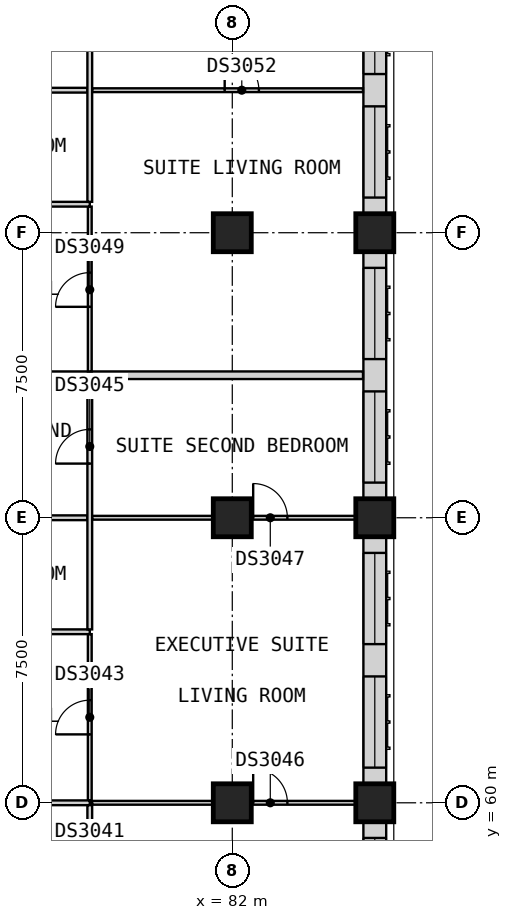
"""IFC4 building model, lengths in metres.
Left out: names, types, materials, properties, quantities, classifications, styles, units other than length and angle.
Written with IfcOpenShell. Run it as: python <this file> out.ifc"""

import sys

from ifc_helpers import new_model, si_unit, direction, frame, frame_2d, origin, origin_2d, place, context, subcontext, project, spatial, rectangle, extrude, element, fill, save


model = new_model("IFC4")
c1 = context("Model", 3, precision=1e-05, world=origin(), true_north=direction((0.0, 1.0)))
c2 = subcontext(c1, "Body", "Model", "MODEL_VIEW")
j1 = project(units=[si_unit("LENGTHUNIT", "METRE"), si_unit("PLANEANGLEUNIT", "RADIAN")], contexts=[c1])
p1 = place(None, origin())
s1 = spatial("IfcSite", under=j1, at=p1, CompositionType="ELEMENT")
p2 = place(p1, origin())
s2 = spatial("IfcBuilding", under=s1, at=p2, CompositionType="ELEMENT")
p3 = place(p2, frame((0.0, 0.0, 137.4)))
s3 = spatial("IfcBuildingStorey", under=s2, at=p3, CompositionType="ELEMENT", Elevation=137.4)
for number, where, z_axis, x_axis in (
    (1, (85.75, 60.0, 0.0), (0.0, 0.0, 1.0), (1.0, 0.0, 0.0)),
    (2, (85.75, 67.5, 0.0), (0.0, 0.0, 1.0), (1.0, 0.0, 0.0)),
    (3, (85.75, 75.0, 0.0), (0.0, 0.0, 1.0), (1.0, 0.0, 0.0)),
    (4, (82.0, 60.0, 0.0), (0.0, 0.0, 1.0), (1.0, 0.0, 0.0)),
    (5, (82.0, 67.5, 0.0), (0.0, 0.0, 1.0), (1.0, 0.0, 0.0)),
    (6, (82.0, 75.0, 0.0), (0.0, 0.0, 1.0), (1.0, 0.0, 0.0)),
):
    element("IfcColumn", number, at=place(p3, frame(where, z_axis=z_axis, x_axis=x_axis)), inside=s3, PredefinedType="COLUMN", context=c2, shape_type="SweptSolid", body=[
        extrude(rectangle(XDim=1.0, YDim=1.0, at=origin_2d()), origin(), (0.0, 0.0, 1.0), 3.6),
    ])
p4 = place(p3, frame((85.75, 53.0, 0.0), z_axis=(0.0, 0.0, 1.0), x_axis=(0.0, 1.0, 0.0)))
e7 = element("IfcWall", 7, at=p4, inside=s3, PredefinedType="SOLIDWALL", context=c2, shape_type="SweptSolid", body=[
    extrude(rectangle(XDim=6.5, YDim=0.6, at=frame_2d((3.25, 0.0))), origin(), (0.0, 0.0, 1.0), 2.85),
])
p5 = place(p4, frame((0.425, 0.0, 0.8)))
e8 = element("IfcOpeningElement", 8, at=p5, cuts=e7, PredefinedType="OPENING", context=c2, shape_type="SweptSolid", body=[
    extrude(rectangle(XDim=2.4, YDim=1.8, at=frame_2d((1.2, 0.9))), frame((0.0, 0.31, 0.0), z_axis=(0.0, -1.0, 0.0), x_axis=(1.0, 0.0, 0.0)), (0.0, 0.0, 1.0), 0.62),
])
p6 = place(p4, frame((3.675, 0.0, 0.8)))
e9 = element("IfcOpeningElement", 9, at=p6, cuts=e7, PredefinedType="OPENING", context=c2, shape_type="SweptSolid", body=[
    extrude(rectangle(XDim=2.4, YDim=1.8, at=frame_2d((1.2, 0.9))), frame((0.0, 0.31, 0.0), z_axis=(0.0, -1.0, 0.0), x_axis=(1.0, 0.0, 0.0)), (0.0, 0.0, 1.0), 0.62),
])
p7 = place(p3, frame((85.75, 60.5, 0.0), z_axis=(0.0, 0.0, 1.0), x_axis=(0.0, 1.0, 0.0)))
e10 = element("IfcWall", 10, at=p7, inside=s3, PredefinedType="SOLIDWALL", context=c2, shape_type="SweptSolid", body=[
    extrude(rectangle(XDim=6.5, YDim=0.6, at=frame_2d((3.25, 0.0))), origin(), (0.0, 0.0, 1.0), 2.85),
])
p8 = place(p7, frame((0.425, 0.0, 0.8)))
e11 = element("IfcOpeningElement", 11, at=p8, cuts=e10, PredefinedType="OPENING", context=c2, shape_type="SweptSolid", body=[
    extrude(rectangle(XDim=2.4, YDim=1.8, at=frame_2d((1.2, 0.9))), frame((0.0, 0.31, 0.0), z_axis=(0.0, -1.0, 0.0), x_axis=(1.0, 0.0, 0.0)), (0.0, 0.0, 1.0), 0.62),
])
p9 = place(p7, frame((3.675, 0.0, 0.8)))
e12 = element("IfcOpeningElement", 12, at=p9, cuts=e10, PredefinedType="OPENING", context=c2, shape_type="SweptSolid", body=[
    extrude(rectangle(XDim=2.4, YDim=1.8, at=frame_2d((1.2, 0.9))), frame((0.0, 0.31, 0.0), z_axis=(0.0, -1.0, 0.0), x_axis=(1.0, 0.0, 0.0)), (0.0, 0.0, 1.0), 0.62),
])
p10 = place(p3, frame((85.75, 68.0, 0.0), z_axis=(0.0, 0.0, 1.0), x_axis=(0.0, 1.0, 0.0)))
e13 = element("IfcWall", 13, at=p10, inside=s3, PredefinedType="SOLIDWALL", context=c2, shape_type="SweptSolid", body=[
    extrude(rectangle(XDim=6.5, YDim=0.6, at=frame_2d((3.25, 0.0))), origin(), (0.0, 0.0, 1.0), 2.85),
])
p11 = place(p10, frame((0.425, 0.0, 0.8)))
e14 = element("IfcOpeningElement", 14, at=p11, cuts=e13, PredefinedType="OPENING", context=c2, shape_type="SweptSolid", body=[
    extrude(rectangle(XDim=2.4, YDim=1.8, at=frame_2d((1.2, 0.9))), frame((0.0, 0.31, 0.0), z_axis=(0.0, -1.0, 0.0), x_axis=(1.0, 0.0, 0.0)), (0.0, 0.0, 1.0), 0.62),
])
p12 = place(p10, frame((3.675, 0.0, 0.8)))
e15 = element("IfcOpeningElement", 15, at=p12, cuts=e13, PredefinedType="OPENING", context=c2, shape_type="SweptSolid", body=[
    extrude(rectangle(XDim=2.4, YDim=1.8, at=frame_2d((1.2, 0.9))), frame((0.0, 0.31, 0.0), z_axis=(0.0, -1.0, 0.0), x_axis=(1.0, 0.0, 0.0)), (0.0, 0.0, 1.0), 0.62),
])
p13 = place(p3, frame((85.75, 75.5, 0.0), z_axis=(0.0, 0.0, 1.0), x_axis=(0.0, 1.0, 0.0)))
e16 = element("IfcWall", 16, at=p13, inside=s3, PredefinedType="SOLIDWALL", context=c2, shape_type="SweptSolid", body=[
    extrude(rectangle(XDim=6.5, YDim=0.6, at=frame_2d((3.25, 0.0))), origin(), (0.0, 0.0, 1.0), 2.85),
])
p14 = place(p13, frame((0.425, 0.0, 0.8)))
e17 = element("IfcOpeningElement", 17, at=p14, cuts=e16, PredefinedType="OPENING", context=c2, shape_type="SweptSolid", body=[
    extrude(rectangle(XDim=2.4, YDim=1.8, at=frame_2d((1.2, 0.9))), frame((0.0, 0.31, 0.0), z_axis=(0.0, -1.0, 0.0), x_axis=(1.0, 0.0, 0.0)), (0.0, 0.0, 1.0), 0.62),
])
p15 = place(p13, frame((3.675, 0.0, 0.8)))
e18 = element("IfcOpeningElement", 18, at=p15, cuts=e16, PredefinedType="OPENING", context=c2, shape_type="SweptSolid", body=[
    extrude(rectangle(XDim=2.4, YDim=1.8, at=frame_2d((1.2, 0.9))), frame((0.0, 0.31, 0.0), z_axis=(0.0, -1.0, 0.0), x_axis=(1.0, 0.0, 0.0)), (0.0, 0.0, 1.0), 0.62),
])
p16 = place(p3, frame((73.725, 71.25, 0.0), z_axis=(0.0, 0.0, 1.0), x_axis=(1.0, 0.0, 0.0)))
e19 = element("IfcWall", 19, at=p16, inside=s3, PredefinedType="PARTITIONING", context=c2, shape_type="SweptSolid", body=[
    extrude(rectangle(XDim=11.715, YDim=0.2, at=frame_2d((5.857, 0.0))), origin(), (0.0, 0.0, 1.0), 3.35),
])
p17 = place(p3, frame((78.312, 60.0, 0.0), z_axis=(0.0, 0.0, 1.0), x_axis=(1.0, 0.0, 0.0)))
e20 = element("IfcWall", 20, at=p17, inside=s3, PredefinedType="PARTITIONING", context=c2, shape_type="SweptSolid", body=[
    extrude(rectangle(XDim=7.938, YDim=0.1, at=frame_2d((3.969, 0.0))), origin(), (0.0, 0.0, 1.0), 3.35),
])
p18 = place(p17, frame((4.238, 0.0, 0.0)))
e21 = element("IfcOpeningElement", 21, at=p18, cuts=e20, PredefinedType="OPENING", context=c2, shape_type="SweptSolid", body=[
    extrude(rectangle(XDim=0.9, YDim=2.1, at=frame_2d((0.45, 1.05))), frame((0.0, 0.06, 0.0), z_axis=(0.0, -1.0, 0.0), x_axis=(1.0, 0.0, 0.0)), (0.0, 0.0, 1.0), 0.12),
])
p19 = place(p3, frame((78.312, 67.5, 0.0), z_axis=(0.0, 0.0, 1.0), x_axis=(1.0, 0.0, 0.0)))
e22 = element("IfcWall", 22, at=p19, inside=s3, PredefinedType="PARTITIONING", context=c2, shape_type="SweptSolid", body=[
    extrude(rectangle(XDim=7.938, YDim=0.1, at=frame_2d((3.969, 0.0))), origin(), (0.0, 0.0, 1.0), 3.35),
])
p20 = place(p19, frame((4.238, 0.0, 0.0)))
e23 = element("IfcOpeningElement", 23, at=p20, cuts=e22, PredefinedType="OPENING", context=c2, shape_type="SweptSolid", body=[
    extrude(rectangle(XDim=0.9, YDim=2.1, at=frame_2d((0.45, 1.05))), frame((0.0, 0.06, 0.0), z_axis=(0.0, -1.0, 0.0), x_axis=(1.0, 0.0, 0.0)), (0.0, 0.0, 1.0), 0.12),
])
p21 = place(p3, frame((78.312, 78.75, 0.0), z_axis=(0.0, 0.0, 1.0), x_axis=(1.0, 0.0, 0.0)))
e24 = element("IfcWall", 24, at=p21, inside=s3, PredefinedType="PARTITIONING", context=c2, shape_type="SweptSolid", body=[
    extrude(rectangle(XDim=7.127, YDim=0.1, at=frame_2d((3.564, 0.0))), origin(), (0.0, 0.0, 1.0), 3.35),
])
p22 = place(p21, frame((3.488, 0.0, 0.0)))
e25 = element("IfcOpeningElement", 25, at=p22, cuts=e24, PredefinedType="OPENING", context=c2, shape_type="SweptSolid", body=[
    extrude(rectangle(XDim=0.9, YDim=2.1, at=frame_2d((0.45, 1.05))), frame((0.0, 0.06, 0.0), z_axis=(0.0, -1.0, 0.0), x_axis=(1.0, 0.0, 0.0)), (0.0, 0.0, 1.0), 0.12),
])
p23 = place(p3, frame((78.25, 60.062, 0.0), z_axis=(0.0, 0.0, 1.0), x_axis=(0.0, 1.0, 0.0)))
e26 = element("IfcWall", 26, at=p23, inside=s3, PredefinedType="PARTITIONING", context=c2, shape_type="SweptSolid", body=[
    extrude(rectangle(XDim=4.375, YDim=0.1, at=frame_2d((2.188, 0.0))), origin(), (0.0, 0.0, 1.0), 3.35),
])
p24 = place(p23, frame((1.738, 0.0, 0.0)))
e27 = element("IfcOpeningElement", 27, at=p24, cuts=e26, PredefinedType="OPENING", context=c2, shape_type="SweptSolid", body=[
    extrude(rectangle(XDim=0.9, YDim=2.1, at=frame_2d((0.45, 1.05))), frame((0.0, 0.06, 0.0), z_axis=(0.0, -1.0, 0.0), x_axis=(1.0, 0.0, 0.0)), (0.0, 0.0, 1.0), 0.12),
])
p25 = place(p3, frame((78.25, 71.35, 0.0), z_axis=(0.0, 0.0, 1.0), x_axis=(0.0, 1.0, 0.0)))
e28 = element("IfcWall", 28, at=p25, inside=s3, PredefinedType="PARTITIONING", context=c2, shape_type="SweptSolid", body=[
    extrude(rectangle(XDim=4.337, YDim=0.1, at=frame_2d((2.169, 0.0))), origin(), (0.0, 0.0, 1.0), 3.35),
])
p26 = place(p25, frame((1.7, 0.0, 0.0)))
e29 = element("IfcOpeningElement", 29, at=p26, cuts=e28, PredefinedType="OPENING", context=c2, shape_type="SweptSolid", body=[
    extrude(rectangle(XDim=0.9, YDim=2.1, at=frame_2d((0.45, 1.05))), frame((0.0, 0.06, 0.0), z_axis=(0.0, -1.0, 0.0), x_axis=(1.0, 0.0, 0.0)), (0.0, 0.0, 1.0), 0.12),
])
p27 = place(p3, frame((73.725, 60.0, 0.0), z_axis=(0.0, 0.0, 1.0), x_axis=(1.0, 0.0, 0.0)))
e30 = element("IfcWall", 30, at=p27, inside=s3, PredefinedType="PARTITIONING", context=c2, shape_type="SweptSolid", body=[
    extrude(rectangle(XDim=4.525, YDim=0.125, at=frame_2d((2.262, 0.0))), origin(), (0.0, 0.0, 1.0), 3.35),
])
p28 = place(p3, frame((73.725, 64.5, 0.0), z_axis=(0.0, 0.0, 1.0), x_axis=(1.0, 0.0, 0.0)))
e31 = element("IfcWall", 31, at=p28, inside=s3, PredefinedType="PARTITIONING", context=c2, shape_type="SweptSolid", body=[
    extrude(rectangle(XDim=4.525, YDim=0.125, at=frame_2d((2.262, 0.0))), origin(), (0.0, 0.0, 1.0), 3.35),
])
p29 = place(p28, frame((1.775, 0.0, 0.0)))
e32 = element("IfcOpeningElement", 32, at=p29, cuts=e31, PredefinedType="OPENING", context=c2, shape_type="SweptSolid", body=[
    extrude(rectangle(XDim=0.9, YDim=2.1, at=frame_2d((0.45, 1.05))), frame((0.0, 0.073, 0.0), z_axis=(0.0, -1.0, 0.0), x_axis=(1.0, 0.0, 0.0)), (0.0, 0.0, 1.0), 0.145),
])
p30 = place(p3, frame((73.725, 67.5, 0.0), z_axis=(0.0, 0.0, 1.0), x_axis=(1.0, 0.0, 0.0)))
e33 = element("IfcWall", 33, at=p30, inside=s3, PredefinedType="PARTITIONING", context=c2, shape_type="SweptSolid", body=[
    extrude(rectangle(XDim=4.462, YDim=0.125, at=frame_2d((2.231, 0.0))), origin(), (0.0, 0.0, 1.0), 3.35),
])
p31 = place(p3, frame((73.725, 75.75, 0.0), z_axis=(0.0, 0.0, 1.0), x_axis=(1.0, 0.0, 0.0)))
e34 = element("IfcWall", 34, at=p31, inside=s3, PredefinedType="PARTITIONING", context=c2, shape_type="SweptSolid", body=[
    extrude(rectangle(XDim=4.525, YDim=0.125, at=frame_2d((2.262, 0.0))), origin(), (0.0, 0.0, 1.0), 3.35),
])
p32 = place(p31, frame((1.775, 0.0, 0.0)))
e35 = element("IfcOpeningElement", 35, at=p32, cuts=e34, PredefinedType="OPENING", context=c2, shape_type="SweptSolid", body=[
    extrude(rectangle(XDim=0.9, YDim=2.1, at=frame_2d((0.45, 1.05))), frame((0.0, 0.073, 0.0), z_axis=(0.0, -1.0, 0.0), x_axis=(1.0, 0.0, 0.0)), (0.0, 0.0, 1.0), 0.145),
])
p33 = place(p3, frame((73.725, 78.75, 0.0), z_axis=(0.0, 0.0, 1.0), x_axis=(1.0, 0.0, 0.0)))
e36 = element("IfcWall", 36, at=p33, inside=s3, PredefinedType="PARTITIONING", context=c2, shape_type="SweptSolid", body=[
    extrude(rectangle(XDim=4.462, YDim=0.125, at=frame_2d((2.231, 0.0))), origin(), (0.0, 0.0, 1.0), 3.35),
])
p34 = place(p3, frame((78.25, 56.35, 0.0), z_axis=(0.0, 0.0, 1.0), x_axis=(0.0, 1.0, 0.0)))
e37 = element("IfcWall", 37, at=p34, inside=s3, PredefinedType="PARTITIONING", context=c2, shape_type="SweptSolid", body=[
    extrude(rectangle(XDim=3.587, YDim=0.125, at=frame_2d((1.794, 0.0))), origin(), (0.0, 0.0, 1.0), 3.35),
])
p35 = place(p34, frame((1.325, 0.0, 0.0)))
e38 = element("IfcOpeningElement", 38, at=p35, cuts=e37, PredefinedType="OPENING", context=c2, shape_type="SweptSolid", body=[
    extrude(rectangle(XDim=0.9, YDim=2.1, at=frame_2d((0.45, 1.05))), frame((0.0, 0.073, 0.0), z_axis=(0.0, -1.0, 0.0), x_axis=(1.0, 0.0, 0.0)), (0.0, 0.0, 1.0), 0.145),
])
p36 = place(p3, frame((78.25, 64.562, 0.0), z_axis=(0.0, 0.0, 1.0), x_axis=(0.0, 1.0, 0.0)))
e39 = element("IfcWall", 39, at=p36, inside=s3, PredefinedType="PARTITIONING", context=c2, shape_type="SweptSolid", body=[
    extrude(rectangle(XDim=6.587, YDim=0.125, at=frame_2d((3.294, 0.0))), origin(), (0.0, 0.0, 1.0), 3.35),
])
p37 = place(p36, frame((4.363, 0.0, 0.0)))
e40 = element("IfcOpeningElement", 40, at=p37, cuts=e39, PredefinedType="OPENING", context=c2, shape_type="SweptSolid", body=[
    extrude(rectangle(XDim=0.9, YDim=2.1, at=frame_2d((0.45, 1.05))), frame((0.0, 0.073, 0.0), z_axis=(0.0, -1.0, 0.0), x_axis=(1.0, 0.0, 0.0)), (0.0, 0.0, 1.0), 0.145),
])
p38 = place(p3, frame((78.25, 75.812, 0.0), z_axis=(0.0, 0.0, 1.0), x_axis=(0.0, 1.0, 0.0)))
e41 = element("IfcWall", 41, at=p38, inside=s3, PredefinedType="PARTITIONING", context=c2, shape_type="SweptSolid", body=[
    extrude(rectangle(XDim=8.5, YDim=0.125, at=frame_2d((4.25, 0.0))), origin(), (0.0, 0.0, 1.0), 3.35),
])
p39 = place(p38, frame((4.363, 0.0, 0.0)))
e42 = element("IfcOpeningElement", 42, at=p39, cuts=e41, PredefinedType="OPENING", context=c2, shape_type="SweptSolid", body=[
    extrude(rectangle(XDim=0.9, YDim=2.1, at=frame_2d((0.45, 1.05))), frame((0.0, 0.073, 0.0), z_axis=(0.0, -1.0, 0.0), x_axis=(1.0, 0.0, 0.0)), (0.0, 0.0, 1.0), 0.145),
])
p40 = place(p38, frame((7.175, 0.0, 0.0)))
e43 = element("IfcOpeningElement", 43, at=p40, cuts=e41, PredefinedType="OPENING", context=c2, shape_type="SweptSolid", body=[
    extrude(rectangle(XDim=0.9, YDim=2.1, at=frame_2d((0.45, 1.05))), frame((0.0, 0.073, 0.0), z_axis=(0.0, -1.0, 0.0), x_axis=(1.0, 0.0, 0.0)), (0.0, 0.0, 1.0), 0.145),
])
p41 = place(p6, origin())
e44 = element("IfcWindow", 44, at=p41, inside=s3, PartitioningType="SINGLE_PANEL", PredefinedType="WINDOW", context=c2, shape_type="SweptSolid", body=[
    extrude(rectangle(XDim=2.4, YDim=1.8, at=frame_2d((1.2, 0.9))), frame((0.0, -0.07, 0.0), z_axis=(0.0, -1.0, 0.0), x_axis=(1.0, 0.0, 0.0)), (0.0, 0.0, 1.0), 0.06),
])
fill(e9, e44)
p42 = place(p8, origin())
e45 = element("IfcWindow", 45, at=p42, inside=s3, PartitioningType="SINGLE_PANEL", PredefinedType="WINDOW", context=c2, shape_type="SweptSolid", body=[
    extrude(rectangle(XDim=2.4, YDim=1.8, at=frame_2d((1.2, 0.9))), frame((0.0, -0.07, 0.0), z_axis=(0.0, -1.0, 0.0), x_axis=(1.0, 0.0, 0.0)), (0.0, 0.0, 1.0), 0.06),
])
fill(e11, e45)
p43 = place(p9, origin())
e46 = element("IfcWindow", 46, at=p43, inside=s3, PartitioningType="SINGLE_PANEL", PredefinedType="WINDOW", context=c2, shape_type="SweptSolid", body=[
    extrude(rectangle(XDim=2.4, YDim=1.8, at=frame_2d((1.2, 0.9))), frame((0.0, -0.07, 0.0), z_axis=(0.0, -1.0, 0.0), x_axis=(1.0, 0.0, 0.0)), (0.0, 0.0, 1.0), 0.06),
])
fill(e12, e46)
p44 = place(p11, origin())
e47 = element("IfcWindow", 47, at=p44, inside=s3, PartitioningType="SINGLE_PANEL", PredefinedType="WINDOW", context=c2, shape_type="SweptSolid", body=[
    extrude(rectangle(XDim=2.4, YDim=1.8, at=frame_2d((1.2, 0.9))), frame((0.0, -0.07, 0.0), z_axis=(0.0, -1.0, 0.0), x_axis=(1.0, 0.0, 0.0)), (0.0, 0.0, 1.0), 0.06),
])
fill(e14, e47)
p45 = place(p12, origin())
e48 = element("IfcWindow", 48, at=p45, inside=s3, PartitioningType="SINGLE_PANEL", PredefinedType="WINDOW", context=c2, shape_type="SweptSolid", body=[
    extrude(rectangle(XDim=2.4, YDim=1.8, at=frame_2d((1.2, 0.9))), frame((0.0, -0.07, 0.0), z_axis=(0.0, -1.0, 0.0), x_axis=(1.0, 0.0, 0.0)), (0.0, 0.0, 1.0), 0.06),
])
fill(e15, e48)
p46 = place(p14, origin())
e49 = element("IfcWindow", 49, at=p46, inside=s3, PartitioningType="SINGLE_PANEL", PredefinedType="WINDOW", context=c2, shape_type="SweptSolid", body=[
    extrude(rectangle(XDim=2.4, YDim=1.8, at=frame_2d((1.2, 0.9))), frame((0.0, -0.07, 0.0), z_axis=(0.0, -1.0, 0.0), x_axis=(1.0, 0.0, 0.0)), (0.0, 0.0, 1.0), 0.06),
])
fill(e17, e49)
p47 = place(p15, origin())
e50 = element("IfcWindow", 50, at=p47, inside=s3, PartitioningType="SINGLE_PANEL", PredefinedType="WINDOW", context=c2, shape_type="SweptSolid", body=[
    extrude(rectangle(XDim=2.4, YDim=1.8, at=frame_2d((1.2, 0.9))), frame((0.0, -0.07, 0.0), z_axis=(0.0, -1.0, 0.0), x_axis=(1.0, 0.0, 0.0)), (0.0, 0.0, 1.0), 0.06),
])
fill(e18, e50)
p48 = place(p24, origin())
e51 = element("IfcDoor", 51, at=p48, inside=s3, OperationType="SINGLE_SWING_LEFT", PredefinedType="DOOR", context=c2, shape_type="SweptSolid", body=[
    extrude(rectangle(XDim=0.9, YDim=2.1, at=frame_2d((0.45, 1.05))), frame((0.0, 0.025, 0.0), z_axis=(0.0, -1.0, 0.0), x_axis=(1.0, 0.0, 0.0)), (0.0, 0.0, 1.0), 0.05),
])
fill(e27, e51)
p49 = place(p37, origin())
e52 = element("IfcDoor", 52, at=p49, inside=s3, OperationType="SINGLE_SWING_LEFT", PredefinedType="DOOR", context=c2, shape_type="SweptSolid", body=[
    extrude(rectangle(XDim=0.9, YDim=2.1, at=frame_2d((0.45, 1.05))), frame((0.0, 0.025, 0.0), z_axis=(0.0, -1.0, 0.0), x_axis=(1.0, 0.0, 0.0)), (0.0, 0.0, 1.0), 0.05),
])
fill(e40, e52)
p50 = place(p18, origin())
e53 = element("IfcDoor", 53, at=p50, inside=s3, OperationType="SINGLE_SWING_LEFT", PredefinedType="DOOR", context=c2, shape_type="SweptSolid", body=[
    extrude(rectangle(XDim=0.9, YDim=2.1, at=frame_2d((0.45, 1.05))), frame((0.0, 0.025, 0.0), z_axis=(0.0, -1.0, 0.0), x_axis=(1.0, 0.0, 0.0)), (0.0, 0.0, 1.0), 0.05),
])
fill(e21, e53)
p51 = place(p20, origin())
e54 = element("IfcDoor", 54, at=p51, inside=s3, OperationType="SINGLE_SWING_LEFT", PredefinedType="DOOR", context=c2, shape_type="SweptSolid", body=[
    extrude(rectangle(XDim=0.9, YDim=2.1, at=frame_2d((0.45, 1.05))), frame((0.0, 0.025, 0.0), z_axis=(0.0, -1.0, 0.0), x_axis=(1.0, 0.0, 0.0)), (0.0, 0.0, 1.0), 0.05),
])
fill(e23, e54)
p52 = place(p26, origin())
e55 = element("IfcDoor", 55, at=p52, inside=s3, OperationType="SINGLE_SWING_LEFT", PredefinedType="DOOR", context=c2, shape_type="SweptSolid", body=[
    extrude(rectangle(XDim=0.9, YDim=2.1, at=frame_2d((0.45, 1.05))), frame((0.0, 0.025, 0.0), z_axis=(0.0, -1.0, 0.0), x_axis=(1.0, 0.0, 0.0)), (0.0, 0.0, 1.0), 0.05),
])
fill(e29, e55)
p53 = place(p22, origin())
e56 = element("IfcDoor", 56, at=p53, inside=s3, OperationType="SINGLE_SWING_RIGHT", PredefinedType="DOOR", context=c2, shape_type="SweptSolid", body=[
    extrude(rectangle(XDim=0.9, YDim=2.1, at=frame_2d((0.45, 1.05))), frame((0.0, 0.025, 0.0), z_axis=(0.0, -1.0, 0.0), x_axis=(1.0, 0.0, 0.0)), (0.0, 0.0, 1.0), 0.05),
])
fill(e25, e56)
save(model, sys.argv[1])
